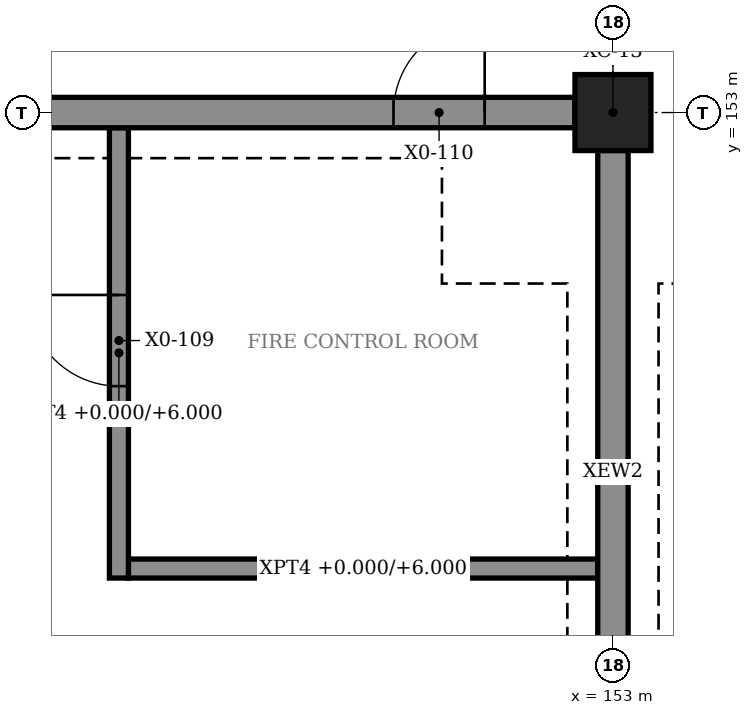
"""IFC4 building model, lengths in metres.
Left out: names, types, materials, properties, quantities, classifications, styles, units other than length and angle.
Written with IfcOpenShell. Run it as: python <this file> out.ifc"""

import sys

from ifc_helpers import new_model, si_unit, direction, frame, frame_2d, origin, origin_2d, place, context, subcontext, project, spatial, rectangle, hollow_rectangle, extrude, element, fill, save


model = new_model("IFC4")
c1 = context("Model", 3, precision=1e-05, world=origin(), true_north=direction((0.0, 1.0)))
c2 = subcontext(c1, "Body", "Model", "MODEL_VIEW")
j1 = project(units=[si_unit("LENGTHUNIT", "METRE"), si_unit("PLANEANGLEUNIT", "RADIAN")], contexts=[c1])
p1 = place(None, origin())
s1 = spatial("IfcSite", under=j1, at=p1, CompositionType="ELEMENT")
p2 = place(p1, origin())
s2 = spatial("IfcBuilding", under=s1, at=p2, CompositionType="ELEMENT")
p3 = place(p2, origin())
s3 = spatial("IfcBuildingStorey", under=s2, at=p3, CompositionType="ELEMENT", Elevation=0.0)
p4 = place(p3, frame((153.0, 153.0, 0.0), z_axis=(0.0, 0.0, 1.0), x_axis=(1.0, 0.0, 0.0)))
e1 = element("IfcColumn", 1, at=p4, inside=s3, PredefinedType="COLUMN", context=c2, shape_type="SweptSolid", body=[
    extrude(hollow_rectangle(XDim=1.0, YDim=1.0, WallThickness=0.032, at=origin_2d()), origin(), (0.0, 0.0, 1.0), 6.0),
])
p5 = place(p3, frame((135.5, 153.0, 0.0), z_axis=(0.0, 0.0, 1.0), x_axis=(1.0, 0.0, 0.0)))
e2 = element("IfcWall", 2, at=p5, inside=s3, PredefinedType="SOLIDWALL", context=c2, shape_type="SweptSolid", body=[
    extrude(rectangle(XDim=17.0, YDim=0.4, at=frame_2d((8.5, 0.0))), origin(), (0.0, 0.0, 1.0), 6.0),
])
p6 = place(p5, frame((0.15, 0.0, 0.0)))
e3 = element("IfcOpeningElement", 3, at=p6, cuts=e2, PredefinedType="OPENING", context=c2, shape_type="SweptSolid", body=[
    extrude(rectangle(XDim=2.7, YDim=2.4, at=frame_2d((1.35, 1.2))), frame((0.0, 0.21, 0.0), z_axis=(0.0, -1.0, 0.0), x_axis=(1.0, 0.0, 0.0)), (0.0, 0.0, 1.0), 0.42),
])
p7 = place(p5, frame((3.65, 0.0, 0.0)))
e4 = element("IfcOpeningElement", 4, at=p7, cuts=e2, PredefinedType="OPENING", context=c2, shape_type="SweptSolid", body=[
    extrude(rectangle(XDim=2.7, YDim=2.4, at=frame_2d((1.35, 1.2))), frame((0.0, 0.21, 0.0), z_axis=(0.0, -1.0, 0.0), x_axis=(1.0, 0.0, 0.0)), (0.0, 0.0, 1.0), 0.42),
])
p8 = place(p5, frame((7.15, 0.0, 0.0)))
e5 = element("IfcOpeningElement", 5, at=p8, cuts=e2, PredefinedType="OPENING", context=c2, shape_type="SweptSolid", body=[
    extrude(rectangle(XDim=2.7, YDim=2.4, at=frame_2d((1.35, 1.2))), frame((0.0, 0.21, 0.0), z_axis=(0.0, -1.0, 0.0), x_axis=(1.0, 0.0, 0.0)), (0.0, 0.0, 1.0), 0.42),
])
p9 = place(p5, frame((14.613, 0.0, 0.0)))
e6 = element("IfcOpeningElement", 6, at=p9, cuts=e2, PredefinedType="OPENING", context=c2, shape_type="SweptSolid", body=[
    extrude(rectangle(XDim=1.2, YDim=2.4, at=frame_2d((0.6, 1.2))), frame((0.0, 0.21, 0.0), z_axis=(0.0, -1.0, 0.0), x_axis=(1.0, 0.0, 0.0)), (0.0, 0.0, 1.0), 0.42),
])
p10 = place(p3, frame((153.0, 144.03, 0.0), z_axis=(0.0, 0.0, 1.0), x_axis=(0.0, 1.0, 0.0)))
e7 = element("IfcWall", 7, at=p10, inside=s3, PredefinedType="SOLIDWALL", context=c2, shape_type="SweptSolid", body=[
    extrude(rectangle(XDim=8.47, YDim=0.4, at=frame_2d((4.235, 0.0))), origin(), (0.0, 0.0, 1.0), 6.0),
])
p11 = place(p3, frame((146.5, 146.875, 0.0), z_axis=(0.0, 0.0, 1.0), x_axis=(0.0, 1.0, 0.0)))
e8 = element("IfcWall", 8, at=p11, inside=s3, PredefinedType="PARTITIONING", context=c2, shape_type="SweptSolid", body=[
    extrude(rectangle(XDim=5.925, YDim=0.25, at=frame_2d((2.962, 0.0))), origin(), (0.0, 0.0, 1.0), 6.0),
])
p12 = place(p11, frame((2.525, 0.0, 0.015)))
e9 = element("IfcOpeningElement", 9, at=p12, cuts=e8, PredefinedType="OPENING", context=c2, shape_type="SweptSolid", body=[
    extrude(rectangle(XDim=1.2, YDim=2.4, at=frame_2d((0.6, 1.2))), frame((0.0, 0.135, 0.0), z_axis=(0.0, -1.0, 0.0), x_axis=(1.0, 0.0, 0.0)), (0.0, 0.0, 1.0), 0.27),
])
p13 = place(p3, frame((146.625, 147.0, 0.0), z_axis=(0.0, 0.0, 1.0), x_axis=(1.0, 0.0, 0.0)))
e10 = element("IfcWall", 10, at=p13, inside=s3, PredefinedType="PARTITIONING", context=c2, shape_type="SweptSolid", body=[
    extrude(rectangle(XDim=6.175, YDim=0.25, at=frame_2d((3.087, 0.0))), origin(), (0.0, 0.0, 1.0), 6.0),
])
p14 = place(p12, origin())
e11 = element("IfcDoor", 11, at=p14, inside=s3, OperationType="SINGLE_SWING_RIGHT", PredefinedType="DOOR", context=c2, shape_type="SweptSolid", body=[
    extrude(rectangle(XDim=1.2, YDim=2.4, at=frame_2d((0.6, 1.2))), frame((0.0, 0.025, 0.0), z_axis=(0.0, -1.0, 0.0), x_axis=(1.0, 0.0, 0.0)), (0.0, 0.0, 1.0), 0.05),
])
fill(e9, e11)
p15 = place(p9, origin())
e12 = element("IfcDoor", 12, at=p15, inside=s3, OperationType="SINGLE_SWING_RIGHT", PredefinedType="DOOR", context=c2, shape_type="SweptSolid", body=[
    extrude(rectangle(XDim=1.2, YDim=2.4, at=frame_2d((0.6, 1.2))), frame((0.0, 0.025, 0.0), z_axis=(0.0, -1.0, 0.0), x_axis=(1.0, 0.0, 0.0)), (0.0, 0.0, 1.0), 0.05),
])
fill(e6, e12)
save(model, sys.argv[1])
